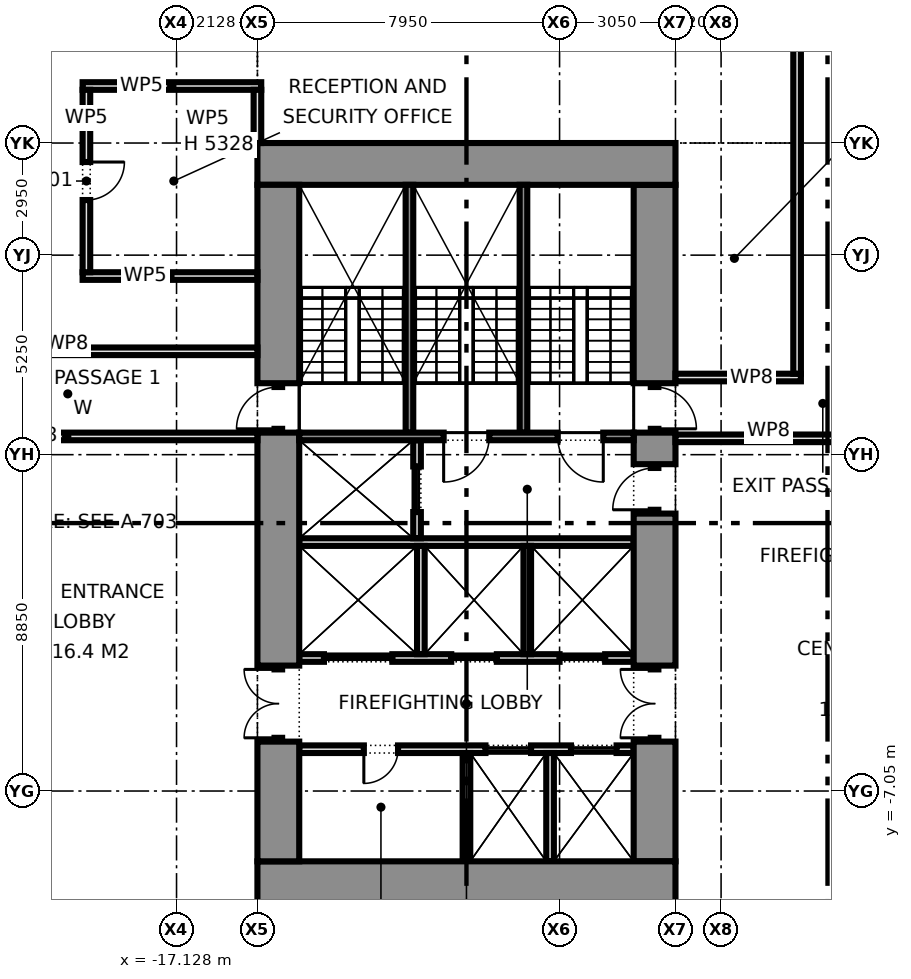
"""IFC4 building model, lengths in metres.
Left out: names, types, materials, properties, quantities, classifications, styles, units other than length and angle.
Written with IfcOpenShell. Run it as: python <this file> out.ifc"""

import sys

from ifc_helpers import new_model, si_unit, direction, frame, frame_2d, origin, place, context, subcontext, project, spatial, rectangle, extrude, element, fill, save


model = new_model("IFC4")
c1 = context("Model", 3, precision=1e-05, world=origin(), true_north=direction((0.0, 1.0)))
c2 = subcontext(c1, "Body", "Model", "MODEL_VIEW")
j1 = project(units=[si_unit("LENGTHUNIT", "METRE"), si_unit("PLANEANGLEUNIT", "RADIAN")], contexts=[c1])
p1 = place(None, origin())
s1 = spatial("IfcSite", under=j1, at=p1, CompositionType="ELEMENT")
p2 = place(p1, origin())
s2 = spatial("IfcBuilding", under=s1, at=p2, CompositionType="ELEMENT")
p3 = place(p2, origin())
s3 = spatial("IfcBuildingStorey", under=s2, at=p3, CompositionType="ELEMENT", Elevation=0.0)
for number, where, z_axis, x_axis in (
    (1, (-15.0, -9.45, 0.0), (0.0, 0.0, 1.0), (1.0, 0.0, 0.0)),
    (2, (-15.0, 9.45, 0.0), (0.0, 0.0, 1.0), (1.0, 0.0, 0.0)),
):
    element("IfcWall", number, at=place(p3, frame(where, z_axis=z_axis, x_axis=x_axis)), inside=s3, PredefinedType="SHEAR", context=c2, shape_type="SweptSolid", body=[
        extrude(rectangle(XDim=11.0, YDim=1.1, at=frame_2d((5.5, 0.0))), origin(), (0.0, 0.0, 1.0), 6.275),
    ])
p4 = place(p3, frame((-14.45, -8.9, 0.0), z_axis=(0.0, 0.0, 1.0), x_axis=(0.0, 1.0, 0.0)))
e3 = element("IfcWall", 3, at=p4, inside=s3, PredefinedType="SHEAR", context=c2, shape_type="SweptSolid", body=[
    extrude(rectangle(XDim=3.15, YDim=1.1, at=frame_2d((1.575, 0.0))), origin(), (0.0, 0.0, 1.0), 6.275),
])
p5 = place(p3, frame((-14.45, -5.75, 0.0), z_axis=(0.0, 0.0, 1.0), x_axis=(0.0, 1.0, 0.0)))
e4 = element("IfcWall", 4, at=p5, inside=s3, PredefinedType="PARTITIONING", context=c2, shape_type="SweptSolid", body=[
    extrude(rectangle(XDim=2.0, YDim=0.2, at=frame_2d((1.0, 0.0))), origin(), (0.0, 0.0, 1.0), 2.4),
])
p6 = place(p5, frame((0.1, 0.0, 0.0)))
e5 = element("IfcOpeningElement", 5, at=p6, cuts=e4, PredefinedType="OPENING", context=c2, shape_type="SweptSolid", body=[
    extrude(rectangle(XDim=1.8, YDim=2.1, at=frame_2d((0.9, 1.05))), frame((0.0, 0.11, 0.0), z_axis=(0.0, -1.0, 0.0), x_axis=(1.0, 0.0, 0.0)), (0.0, 0.0, 1.0), 0.22),
])
p7 = place(p3, frame((-14.45, -3.75, 0.0), z_axis=(0.0, 0.0, 1.0), x_axis=(0.0, 1.0, 0.0)))
e6 = element("IfcWall", 6, at=p7, inside=s3, PredefinedType="SHEAR", context=c2, shape_type="SweptSolid", body=[
    extrude(rectangle(XDim=6.13, YDim=1.1, at=frame_2d((3.065, 0.0))), origin(), (0.0, 0.0, 1.0), 6.275),
])
p8 = place(p3, frame((-14.45, 2.38, 0.0), z_axis=(0.0, 0.0, 1.0), x_axis=(0.0, 1.0, 0.0)))
e7 = element("IfcWall", 7, at=p8, inside=s3, PredefinedType="SHEAR", context=c2, shape_type="SweptSolid", body=[
    extrude(rectangle(XDim=1.3, YDim=0.2, at=frame_2d((0.65, 0.0))), origin(), (0.0, 0.0, 1.0), 2.4),
])
p9 = place(p8, frame((0.1, 0.0, 0.0)))
e8 = element("IfcOpeningElement", 8, at=p9, cuts=e7, PredefinedType="OPENING", context=c2, shape_type="SweptSolid", body=[
    extrude(rectangle(XDim=1.1, YDim=2.1, at=frame_2d((0.55, 1.05))), frame((0.0, 0.11, 0.0), z_axis=(0.0, -1.0, 0.0), x_axis=(1.0, 0.0, 0.0)), (0.0, 0.0, 1.0), 0.22),
])
p10 = place(p3, frame((-14.45, 3.68, 0.0), z_axis=(0.0, 0.0, 1.0), x_axis=(0.0, 1.0, 0.0)))
e9 = element("IfcWall", 9, at=p10, inside=s3, PredefinedType="SHEAR", context=c2, shape_type="SweptSolid", body=[
    extrude(rectangle(XDim=5.22, YDim=1.1, at=frame_2d((2.61, 0.0))), origin(), (0.0, 0.0, 1.0), 6.275),
])
p11 = place(p3, frame((-4.55, -8.9, 0.0), z_axis=(0.0, 0.0, 1.0), x_axis=(0.0, 1.0, 0.0)))
e10 = element("IfcWall", 10, at=p11, inside=s3, PredefinedType="SHEAR", context=c2, shape_type="SweptSolid", body=[
    extrude(rectangle(XDim=3.15, YDim=1.1, at=frame_2d((1.575, 0.0))), origin(), (0.0, 0.0, 1.0), 6.275),
])
p12 = place(p3, frame((-4.55, -5.75, 0.0), z_axis=(0.0, 0.0, 1.0), x_axis=(0.0, 1.0, 0.0)))
e11 = element("IfcWall", 11, at=p12, inside=s3, PredefinedType="PARTITIONING", context=c2, shape_type="SweptSolid", body=[
    extrude(rectangle(XDim=2.0, YDim=0.2, at=frame_2d((1.0, 0.0))), origin(), (0.0, 0.0, 1.0), 2.4),
])
p13 = place(p12, frame((0.1, 0.0, 0.0)))
e12 = element("IfcOpeningElement", 12, at=p13, cuts=e11, PredefinedType="OPENING", context=c2, shape_type="SweptSolid", body=[
    extrude(rectangle(XDim=1.8, YDim=2.1, at=frame_2d((0.9, 1.05))), frame((0.0, 0.11, 0.0), z_axis=(0.0, -1.0, 0.0), x_axis=(1.0, 0.0, 0.0)), (0.0, 0.0, 1.0), 0.22),
])
p14 = place(p3, frame((-4.55, -3.75, 0.0), z_axis=(0.0, 0.0, 1.0), x_axis=(0.0, 1.0, 0.0)))
e13 = element("IfcWall", 13, at=p14, inside=s3, PredefinedType="SHEAR", context=c2, shape_type="SweptSolid", body=[
    extrude(rectangle(XDim=4.0, YDim=1.1, at=frame_2d((2.0, 0.0))), origin(), (0.0, 0.0, 1.0), 6.275),
])
p15 = place(p3, frame((-4.55, 0.25, 0.0), z_axis=(0.0, 0.0, 1.0), x_axis=(0.0, 1.0, 0.0)))
e14 = element("IfcWall", 14, at=p15, inside=s3, PredefinedType="PARTITIONING", context=c2, shape_type="SweptSolid", body=[
    extrude(rectangle(XDim=1.3, YDim=0.2, at=frame_2d((0.65, 0.0))), origin(), (0.0, 0.0, 1.0), 2.4),
])
p16 = place(p15, frame((0.1, 0.0, 0.0)))
e15 = element("IfcOpeningElement", 15, at=p16, cuts=e14, PredefinedType="OPENING", context=c2, shape_type="SweptSolid", body=[
    extrude(rectangle(XDim=1.1, YDim=2.1, at=frame_2d((0.55, 1.05))), frame((0.0, 0.11, 0.0), z_axis=(0.0, -1.0, 0.0), x_axis=(1.0, 0.0, 0.0)), (0.0, 0.0, 1.0), 0.22),
])
p17 = place(p3, frame((-4.55, 1.55, 0.0), z_axis=(0.0, 0.0, 1.0), x_axis=(0.0, 1.0, 0.0)))
e16 = element("IfcWall", 16, at=p17, inside=s3, PredefinedType="SHEAR", context=c2, shape_type="SweptSolid", body=[
    extrude(rectangle(XDim=0.83, YDim=1.1, at=frame_2d((0.415, 0.0))), origin(), (0.0, 0.0, 1.0), 6.275),
])
p18 = place(p3, frame((-4.55, 2.38, 0.0), z_axis=(0.0, 0.0, 1.0), x_axis=(0.0, 1.0, 0.0)))
e17 = element("IfcWall", 17, at=p18, inside=s3, PredefinedType="SHEAR", context=c2, shape_type="SweptSolid", body=[
    extrude(rectangle(XDim=1.3, YDim=0.2, at=frame_2d((0.65, 0.0))), origin(), (0.0, 0.0, 1.0), 2.4),
])
p19 = place(p18, frame((0.1, 0.0, 0.0)))
e18 = element("IfcOpeningElement", 18, at=p19, cuts=e17, PredefinedType="OPENING", context=c2, shape_type="SweptSolid", body=[
    extrude(rectangle(XDim=1.1, YDim=2.1, at=frame_2d((0.55, 1.05))), frame((0.0, 0.11, 0.0), z_axis=(0.0, -1.0, 0.0), x_axis=(1.0, 0.0, 0.0)), (0.0, 0.0, 1.0), 0.22),
])
p20 = place(p3, frame((-4.55, 3.68, 0.0), z_axis=(0.0, 0.0, 1.0), x_axis=(0.0, 1.0, 0.0)))
e19 = element("IfcWall", 19, at=p20, inside=s3, PredefinedType="SHEAR", context=c2, shape_type="SweptSolid", body=[
    extrude(rectangle(XDim=5.22, YDim=1.1, at=frame_2d((2.61, 0.0))), origin(), (0.0, 0.0, 1.0), 6.275),
])
p21 = place(p3, frame((-13.9, -5.95, 0.0), z_axis=(0.0, 0.0, 1.0), x_axis=(1.0, 0.0, 0.0)))
e20 = element("IfcWall", 20, at=p21, inside=s3, PredefinedType="PARTITIONING", context=c2, shape_type="SweptSolid", body=[
    extrude(rectangle(XDim=8.8, YDim=0.2, at=frame_2d((4.4, 0.0))), origin(), (0.0, 0.0, 1.0), 6.275),
])
p22 = place(p21, frame((4.9, 0.0, 0.0)))
e21 = element("IfcOpeningElement", 21, at=p22, cuts=e20, PredefinedType="OPENING", context=c2, shape_type="SweptSolid", body=[
    extrude(rectangle(XDim=1.2, YDim=2.1, at=frame_2d((0.6, 1.05))), frame((0.0, 0.11, 0.0), z_axis=(0.0, -1.0, 0.0), x_axis=(1.0, 0.0, 0.0)), (0.0, 0.0, 1.0), 0.22),
])
p23 = place(p21, frame((7.15, 0.0, 0.0)))
e22 = element("IfcOpeningElement", 22, at=p23, cuts=e20, PredefinedType="OPENING", context=c2, shape_type="SweptSolid", body=[
    extrude(rectangle(XDim=1.2, YDim=2.1, at=frame_2d((0.6, 1.05))), frame((0.0, 0.11, 0.0), z_axis=(0.0, -1.0, 0.0), x_axis=(1.0, 0.0, 0.0)), (0.0, 0.0, 1.0), 0.22),
])
p24 = place(p21, frame((1.7, 0.0, 0.0)))
e23 = element("IfcOpeningElement", 23, at=p24, cuts=e20, PredefinedType="OPENING", context=c2, shape_type="SweptSolid", body=[
    extrude(rectangle(XDim=0.9, YDim=2.1, at=frame_2d((0.45, 1.05))), frame((0.0, 0.11, 0.0), z_axis=(0.0, -1.0, 0.0), x_axis=(1.0, 0.0, 0.0)), (0.0, 0.0, 1.0), 0.22),
])
p25 = place(p3, frame((-13.9, -3.55, 0.0), z_axis=(0.0, 0.0, 1.0), x_axis=(1.0, 0.0, 0.0)))
e24 = element("IfcWall", 24, at=p25, inside=s3, PredefinedType="PARTITIONING", context=c2, shape_type="SweptSolid", body=[
    extrude(rectangle(XDim=8.8, YDim=0.2, at=frame_2d((4.4, 0.0))), origin(), (0.0, 0.0, 1.0), 6.275),
])
p26 = place(p25, frame((0.65, 0.0, 0.0)))
e25 = element("IfcOpeningElement", 25, at=p26, cuts=e24, PredefinedType="OPENING", context=c2, shape_type="SweptSolid", body=[
    extrude(rectangle(XDim=1.8, YDim=2.1, at=frame_2d((0.9, 1.05))), frame((0.0, 0.11, 0.0), z_axis=(0.0, -1.0, 0.0), x_axis=(1.0, 0.0, 0.0)), (0.0, 0.0, 1.0), 0.22),
])
p27 = place(p25, frame((4.0, 0.0, 0.0)))
e26 = element("IfcOpeningElement", 26, at=p27, cuts=e24, PredefinedType="OPENING", context=c2, shape_type="SweptSolid", body=[
    extrude(rectangle(XDim=1.2, YDim=2.1, at=frame_2d((0.6, 1.05))), frame((0.0, 0.11, 0.0), z_axis=(0.0, -1.0, 0.0), x_axis=(1.0, 0.0, 0.0)), (0.0, 0.0, 1.0), 0.22),
])
p28 = place(p25, frame((6.85, 0.0, 0.0)))
e27 = element("IfcOpeningElement", 27, at=p28, cuts=e24, PredefinedType="OPENING", context=c2, shape_type="SweptSolid", body=[
    extrude(rectangle(XDim=1.2, YDim=2.1, at=frame_2d((0.6, 1.05))), frame((0.0, 0.11, 0.0), z_axis=(0.0, -1.0, 0.0), x_axis=(1.0, 0.0, 0.0)), (0.0, 0.0, 1.0), 0.22),
])
p29 = place(p3, frame((-13.9, -0.5, 0.0), z_axis=(0.0, 0.0, 1.0), x_axis=(1.0, 0.0, 0.0)))
e28 = element("IfcWall", 28, at=p29, inside=s3, PredefinedType="PARTITIONING", context=c2, shape_type="SweptSolid", body=[
    extrude(rectangle(XDim=8.8, YDim=0.2, at=frame_2d((4.4, 0.0))), origin(), (0.0, 0.0, 1.0), 6.275),
])
p30 = place(p3, frame((-10.8, -0.4, 0.0), z_axis=(0.0, 0.0, 1.0), x_axis=(0.0, 1.0, 0.0)))
e29 = element("IfcWall", 29, at=p30, inside=s3, PredefinedType="PARTITIONING", context=c2, shape_type="SweptSolid", body=[
    extrude(rectangle(XDim=2.58, YDim=0.2, at=frame_2d((1.29, 0.0))), origin(), (0.0, 0.0, 1.0), 6.275),
])
p31 = place(p30, frame((0.69, 0.0, 0.0)))
e30 = element("IfcOpeningElement", 30, at=p31, cuts=e29, PredefinedType="OPENING", context=c2, shape_type="SweptSolid", body=[
    extrude(rectangle(XDim=1.2, YDim=2.1, at=frame_2d((0.6, 1.05))), frame((0.0, 0.11, 0.0), z_axis=(0.0, -1.0, 0.0), x_axis=(1.0, 0.0, 0.0)), (0.0, 0.0, 1.0), 0.22),
])
p32 = place(p3, frame((-13.9, 2.28, 0.0), z_axis=(0.0, 0.0, 1.0), x_axis=(1.0, 0.0, 0.0)))
e31 = element("IfcWall", 31, at=p32, inside=s3, PredefinedType="SHEAR", context=c2, shape_type="SweptSolid", body=[
    extrude(rectangle(XDim=8.8, YDim=0.2, at=frame_2d((4.4, 0.0))), origin(), (0.0, 0.0, 1.0), 6.275),
])
p33 = place(p32, frame((3.8, 0.0, 0.0)))
e32 = element("IfcOpeningElement", 32, at=p33, cuts=e31, PredefinedType="OPENING", context=c2, shape_type="SweptSolid", body=[
    extrude(rectangle(XDim=1.2, YDim=2.1, at=frame_2d((0.6, 1.05))), frame((0.0, 0.11, 0.0), z_axis=(0.0, -1.0, 0.0), x_axis=(1.0, 0.0, 0.0)), (0.0, 0.0, 1.0), 0.22),
])
p34 = place(p32, frame((6.8, 0.0, 0.0)))
e33 = element("IfcOpeningElement", 33, at=p34, cuts=e31, PredefinedType="OPENING", context=c2, shape_type="SweptSolid", body=[
    extrude(rectangle(XDim=1.2, YDim=2.1, at=frame_2d((0.6, 1.05))), frame((0.0, 0.11, 0.0), z_axis=(0.0, -1.0, 0.0), x_axis=(1.0, 0.0, 0.0)), (0.0, 0.0, 1.0), 0.22),
])
for number, where, z_axis, x_axis in (
    (34, (-11.0, 2.38, 0.0), (0.0, 0.0, 1.0), (0.0, 1.0, 0.0)),
    (35, (-8.0, 2.38, 0.0), (0.0, 0.0, 1.0), (0.0, 1.0, 0.0)),
):
    element("IfcWall", number, at=place(p3, frame(where, z_axis=z_axis, x_axis=x_axis)), inside=s3, PredefinedType="SHEAR", context=c2, shape_type="SweptSolid", body=[
        extrude(rectangle(XDim=6.52, YDim=0.2, at=frame_2d((3.26, 0.0))), origin(), (0.0, 0.0, 1.0), 6.275),
    ])
for number, where, z_axis, x_axis in (
    (36, (-9.5, -8.9, 0.0), (0.0, 0.0, 1.0), (0.0, 1.0, 0.0)),
    (37, (-7.3, -8.9, 0.0), (0.0, 0.0, 1.0), (0.0, 1.0, 0.0)),
    (38, (-10.7, -3.45, 0.0), (0.0, 0.0, 1.0), (0.0, 1.0, 0.0)),
    (39, (-7.9, -3.45, 0.0), (0.0, 0.0, 1.0), (0.0, 1.0, 0.0)),
):
    element("IfcWall", number, at=place(p3, frame(where, z_axis=z_axis, x_axis=x_axis)), inside=s3, PredefinedType="PARTITIONING", context=c2, shape_type="SweptSolid", body=[
        extrude(rectangle(XDim=2.85, YDim=0.2, at=frame_2d((1.425, 0.0))), origin(), (0.0, 0.0, 1.0), 6.275),
    ])
p35 = place(p3, frame((-19.6, 6.5, 0.0), z_axis=(0.0, 0.0, 1.0), x_axis=(1.0, 0.0, 0.0)))
e40 = element("IfcWall", 40, at=p35, inside=s3, PredefinedType="PARTITIONING", context=c2, shape_type="SweptSolid", body=[
    extrude(rectangle(XDim=4.6, YDim=0.2, at=frame_2d((2.3, 0.0))), origin(), (0.0, 0.0, 1.0), 6.275),
])
p36 = place(p3, frame((-19.6, 11.5, 0.0), z_axis=(0.0, 0.0, 1.0), x_axis=(1.0, 0.0, 0.0)))
e41 = element("IfcWall", 41, at=p36, inside=s3, PredefinedType="PARTITIONING", context=c2, shape_type="SweptSolid", body=[
    extrude(rectangle(XDim=4.7, YDim=0.2, at=frame_2d((2.35, 0.0))), origin(), (0.0, 0.0, 1.0), 6.275),
])
p37 = place(p3, frame((-15.0, 10.0, 0.0), z_axis=(0.0, 0.0, 1.0), x_axis=(0.0, 1.0, 0.0)))
e42 = element("IfcWall", 42, at=p37, inside=s3, PredefinedType="PARTITIONING", context=c2, shape_type="SweptSolid", body=[
    extrude(rectangle(XDim=1.4, YDim=0.2, at=frame_2d((0.7, 0.0))), origin(), (0.0, 0.0, 1.0), 5.328),
])
p38 = place(p3, frame((-19.5, 6.6, 0.0), z_axis=(0.0, 0.0, 1.0), x_axis=(0.0, 1.0, 0.0)))
e43 = element("IfcWall", 43, at=p38, inside=s3, PredefinedType="PARTITIONING", context=c2, shape_type="SweptSolid", body=[
    extrude(rectangle(XDim=4.8, YDim=0.2, at=frame_2d((2.4, 0.0))), origin(), (0.0, 0.0, 1.0), 6.275),
])
p39 = place(p38, frame((1.9, 0.0, 0.0)))
e44 = element("IfcOpeningElement", 44, at=p39, cuts=e43, PredefinedType="OPENING", context=c2, shape_type="SweptSolid", body=[
    extrude(rectangle(XDim=1.0, YDim=2.1, at=frame_2d((0.5, 1.05))), frame((0.0, 0.11, 0.0), z_axis=(0.0, -1.0, 0.0), x_axis=(1.0, 0.0, 0.0)), (0.0, 0.0, 1.0), 0.22),
])
p40 = place(p3, frame((-4.0, 2.23, 0.0), z_axis=(0.0, 0.0, 1.0), x_axis=(1.0, 0.0, 0.0)))
e45 = element("IfcWall", 45, at=p40, inside=s3, PredefinedType="PARTITIONING", context=c2, shape_type="SweptSolid", body=[
    extrude(rectangle(XDim=4.9, YDim=0.2, at=frame_2d((2.45, 0.0))), origin(), (0.0, 0.0, 1.0), 6.275),
])
p41 = place(p3, frame((-25.03, 2.28, 0.0), z_axis=(0.0, 0.0, 1.0), x_axis=(1.0, 0.0, 0.0)))
e46 = element("IfcWall", 46, at=p41, inside=s3, PredefinedType="PARTITIONING", context=c2, shape_type="SweptSolid", body=[
    extrude(rectangle(XDim=10.03, YDim=0.2, at=frame_2d((5.015, 0.0))), origin(), (0.0, 0.0, 1.0), 6.275),
])
p42 = place(p3, frame((-4.0, 3.83, 0.0), z_axis=(0.0, 0.0, 1.0), x_axis=(1.0, 0.0, 0.0)))
e47 = element("IfcWall", 47, at=p42, inside=s3, PredefinedType="PARTITIONING", context=c2, shape_type="SweptSolid", body=[
    extrude(rectangle(XDim=3.3, YDim=0.2, at=frame_2d((1.65, 0.0))), origin(), (0.0, 0.0, 1.0), 6.275),
])
p43 = place(p3, frame((-25.03, 4.52, 0.0), z_axis=(0.0, 0.0, 1.0), x_axis=(1.0, 0.0, 0.0)))
e48 = element("IfcWall", 48, at=p43, inside=s3, PredefinedType="PARTITIONING", context=c2, shape_type="SweptSolid", body=[
    extrude(rectangle(XDim=10.03, YDim=0.2, at=frame_2d((5.015, 0.0))), origin(), (0.0, 0.0, 1.0), 6.275),
])
p44 = place(p3, frame((-0.8, 3.93, 0.0), z_axis=(0.0, 0.0, 1.0), x_axis=(0.0, 1.0, 0.0)))
e49 = element("IfcWall", 49, at=p44, inside=s3, PredefinedType="PARTITIONING", context=c2, shape_type="SweptSolid", body=[
    extrude(rectangle(XDim=21.1, YDim=0.2, at=frame_2d((10.55, 0.0))), origin(), (0.0, 0.0, 1.0), 6.275),
])
p45 = place(p6, origin())
e50 = element("IfcDoor", 50, at=p45, inside=s3, OperationType="DOUBLE_DOOR_SINGLE_SWING", PredefinedType="DOOR", context=c2, shape_type="SweptSolid", body=[
    extrude(rectangle(XDim=1.8, YDim=2.1, at=frame_2d((0.9, 1.05))), frame((0.0, 0.025, 0.0), z_axis=(0.0, -1.0, 0.0), x_axis=(1.0, 0.0, 0.0)), (0.0, 0.0, 1.0), 0.05),
])
fill(e5, e50)
p46 = place(p9, origin())
e51 = element("IfcDoor", 51, at=p46, inside=s3, OperationType="SINGLE_SWING_LEFT", PredefinedType="DOOR", context=c2, shape_type="SweptSolid", body=[
    extrude(rectangle(XDim=1.1, YDim=2.1, at=frame_2d((0.55, 1.05))), frame((0.0, 0.025, 0.0), z_axis=(0.0, -1.0, 0.0), x_axis=(1.0, 0.0, 0.0)), (0.0, 0.0, 1.0), 0.05),
])
fill(e8, e51)
p47 = place(p13, origin())
e52 = element("IfcDoor", 52, at=p47, inside=s3, OperationType="DOUBLE_DOOR_SINGLE_SWING", PredefinedType="DOOR", context=c2, shape_type="SweptSolid", body=[
    extrude(rectangle(XDim=1.8, YDim=2.1, at=frame_2d((0.9, 1.05))), frame((0.0, 0.025, 0.0), z_axis=(0.0, -1.0, 0.0), x_axis=(1.0, 0.0, 0.0)), (0.0, 0.0, 1.0), 0.05),
])
fill(e12, e52)
p48 = place(p16, origin())
e53 = element("IfcDoor", 53, at=p48, inside=s3, OperationType="SINGLE_SWING_LEFT", PredefinedType="DOOR", context=c2, shape_type="SweptSolid", body=[
    extrude(rectangle(XDim=1.1, YDim=2.1, at=frame_2d((0.55, 1.05))), frame((0.0, 0.025, 0.0), z_axis=(0.0, -1.0, 0.0), x_axis=(1.0, 0.0, 0.0)), (0.0, 0.0, 1.0), 0.05),
])
fill(e15, e53)
p49 = place(p19, frame((1.1, 0.0, 0.0), z_axis=(0.0, 0.0, 1.0), x_axis=(-1.0, 0.0, 0.0)))
e54 = element("IfcDoor", 54, at=p49, inside=s3, OperationType="SINGLE_SWING_RIGHT", PredefinedType="DOOR", context=c2, shape_type="SweptSolid", body=[
    extrude(rectangle(XDim=1.1, YDim=2.1, at=frame_2d((0.55, 1.05))), frame((0.0, 0.025, 0.0), z_axis=(0.0, -1.0, 0.0), x_axis=(1.0, 0.0, 0.0)), (0.0, 0.0, 1.0), 0.05),
])
fill(e18, e54)
p50 = place(p22, origin())
e55 = element("IfcDoor", 55, at=p50, inside=s3, OperationType="DOUBLE_DOOR_SLIDING", PredefinedType="DOOR", context=c2, shape_type="SweptSolid", body=[
    extrude(rectangle(XDim=1.2, YDim=2.1, at=frame_2d((0.6, 1.05))), frame((0.0, 0.025, 0.0), z_axis=(0.0, -1.0, 0.0), x_axis=(1.0, 0.0, 0.0)), (0.0, 0.0, 1.0), 0.05),
])
fill(e21, e55)
p51 = place(p23, origin())
e56 = element("IfcDoor", 56, at=p51, inside=s3, OperationType="DOUBLE_DOOR_SLIDING", PredefinedType="DOOR", context=c2, shape_type="SweptSolid", body=[
    extrude(rectangle(XDim=1.2, YDim=2.1, at=frame_2d((0.6, 1.05))), frame((0.0, 0.025, 0.0), z_axis=(0.0, -1.0, 0.0), x_axis=(1.0, 0.0, 0.0)), (0.0, 0.0, 1.0), 0.05),
])
fill(e22, e56)
p52 = place(p26, origin())
e57 = element("IfcDoor", 57, at=p52, inside=s3, OperationType="DOUBLE_DOOR_SLIDING", PredefinedType="DOOR", context=c2, shape_type="SweptSolid", body=[
    extrude(rectangle(XDim=1.8, YDim=2.1, at=frame_2d((0.9, 1.05))), frame((0.0, 0.025, 0.0), z_axis=(0.0, -1.0, 0.0), x_axis=(1.0, 0.0, 0.0)), (0.0, 0.0, 1.0), 0.05),
])
fill(e25, e57)
p53 = place(p27, origin())
e58 = element("IfcDoor", 58, at=p53, inside=s3, OperationType="DOUBLE_DOOR_SLIDING", PredefinedType="DOOR", context=c2, shape_type="SweptSolid", body=[
    extrude(rectangle(XDim=1.2, YDim=2.1, at=frame_2d((0.6, 1.05))), frame((0.0, 0.025, 0.0), z_axis=(0.0, -1.0, 0.0), x_axis=(1.0, 0.0, 0.0)), (0.0, 0.0, 1.0), 0.05),
])
fill(e26, e58)
p54 = place(p28, origin())
e59 = element("IfcDoor", 59, at=p54, inside=s3, OperationType="DOUBLE_DOOR_SLIDING", PredefinedType="DOOR", context=c2, shape_type="SweptSolid", body=[
    extrude(rectangle(XDim=1.2, YDim=2.1, at=frame_2d((0.6, 1.05))), frame((0.0, 0.025, 0.0), z_axis=(0.0, -1.0, 0.0), x_axis=(1.0, 0.0, 0.0)), (0.0, 0.0, 1.0), 0.05),
])
fill(e27, e59)
p55 = place(p31, origin())
e60 = element("IfcDoor", 60, at=p55, inside=s3, OperationType="DOUBLE_DOOR_SLIDING", PredefinedType="DOOR", context=c2, shape_type="SweptSolid", body=[
    extrude(rectangle(XDim=1.2, YDim=2.1, at=frame_2d((0.6, 1.05))), frame((0.0, 0.025, 0.0), z_axis=(0.0, -1.0, 0.0), x_axis=(1.0, 0.0, 0.0)), (0.0, 0.0, 1.0), 0.05),
])
fill(e30, e60)
p56 = place(p24, frame((0.9, 0.0, 0.0), z_axis=(0.0, 0.0, 1.0), x_axis=(-1.0, 0.0, 0.0)))
e61 = element("IfcDoor", 61, at=p56, inside=s3, OperationType="SINGLE_SWING_RIGHT", PredefinedType="DOOR", context=c2, shape_type="SweptSolid", body=[
    extrude(rectangle(XDim=0.9, YDim=2.1, at=frame_2d((0.45, 1.05))), frame((0.0, 0.025, 0.0), z_axis=(0.0, -1.0, 0.0), x_axis=(1.0, 0.0, 0.0)), (0.0, 0.0, 1.0), 0.05),
])
fill(e23, e61)
p57 = place(p33, frame((1.2, 0.0, 0.0), z_axis=(0.0, 0.0, 1.0), x_axis=(-1.0, 0.0, 0.0)))
e62 = element("IfcDoor", 62, at=p57, inside=s3, OperationType="SINGLE_SWING_RIGHT", PredefinedType="DOOR", context=c2, shape_type="SweptSolid", body=[
    extrude(rectangle(XDim=1.2, YDim=2.1, at=frame_2d((0.6, 1.05))), frame((0.0, 0.025, 0.0), z_axis=(0.0, -1.0, 0.0), x_axis=(1.0, 0.0, 0.0)), (0.0, 0.0, 1.0), 0.05),
])
fill(e32, e62)
p58 = place(p34, frame((1.2, 0.0, 0.0), z_axis=(0.0, 0.0, 1.0), x_axis=(-1.0, 0.0, 0.0)))
e63 = element("IfcDoor", 63, at=p58, inside=s3, OperationType="SINGLE_SWING_LEFT", PredefinedType="DOOR", context=c2, shape_type="SweptSolid", body=[
    extrude(rectangle(XDim=1.2, YDim=2.1, at=frame_2d((0.6, 1.05))), frame((0.0, 0.025, 0.0), z_axis=(0.0, -1.0, 0.0), x_axis=(1.0, 0.0, 0.0)), (0.0, 0.0, 1.0), 0.05),
])
fill(e33, e63)
p59 = place(p39, frame((1.0, 0.0, 0.0), z_axis=(0.0, 0.0, 1.0), x_axis=(-1.0, 0.0, 0.0)))
e64 = element("IfcDoor", 64, at=p59, inside=s3, OperationType="SINGLE_SWING_LEFT", PredefinedType="DOOR", context=c2, shape_type="SweptSolid", body=[
    extrude(rectangle(XDim=1.0, YDim=2.1, at=frame_2d((0.5, 1.05))), frame((0.0, 0.025, 0.0), z_axis=(0.0, -1.0, 0.0), x_axis=(1.0, 0.0, 0.0)), (0.0, 0.0, 1.0), 0.05),
])
fill(e44, e64)
save(model, sys.argv[1])
